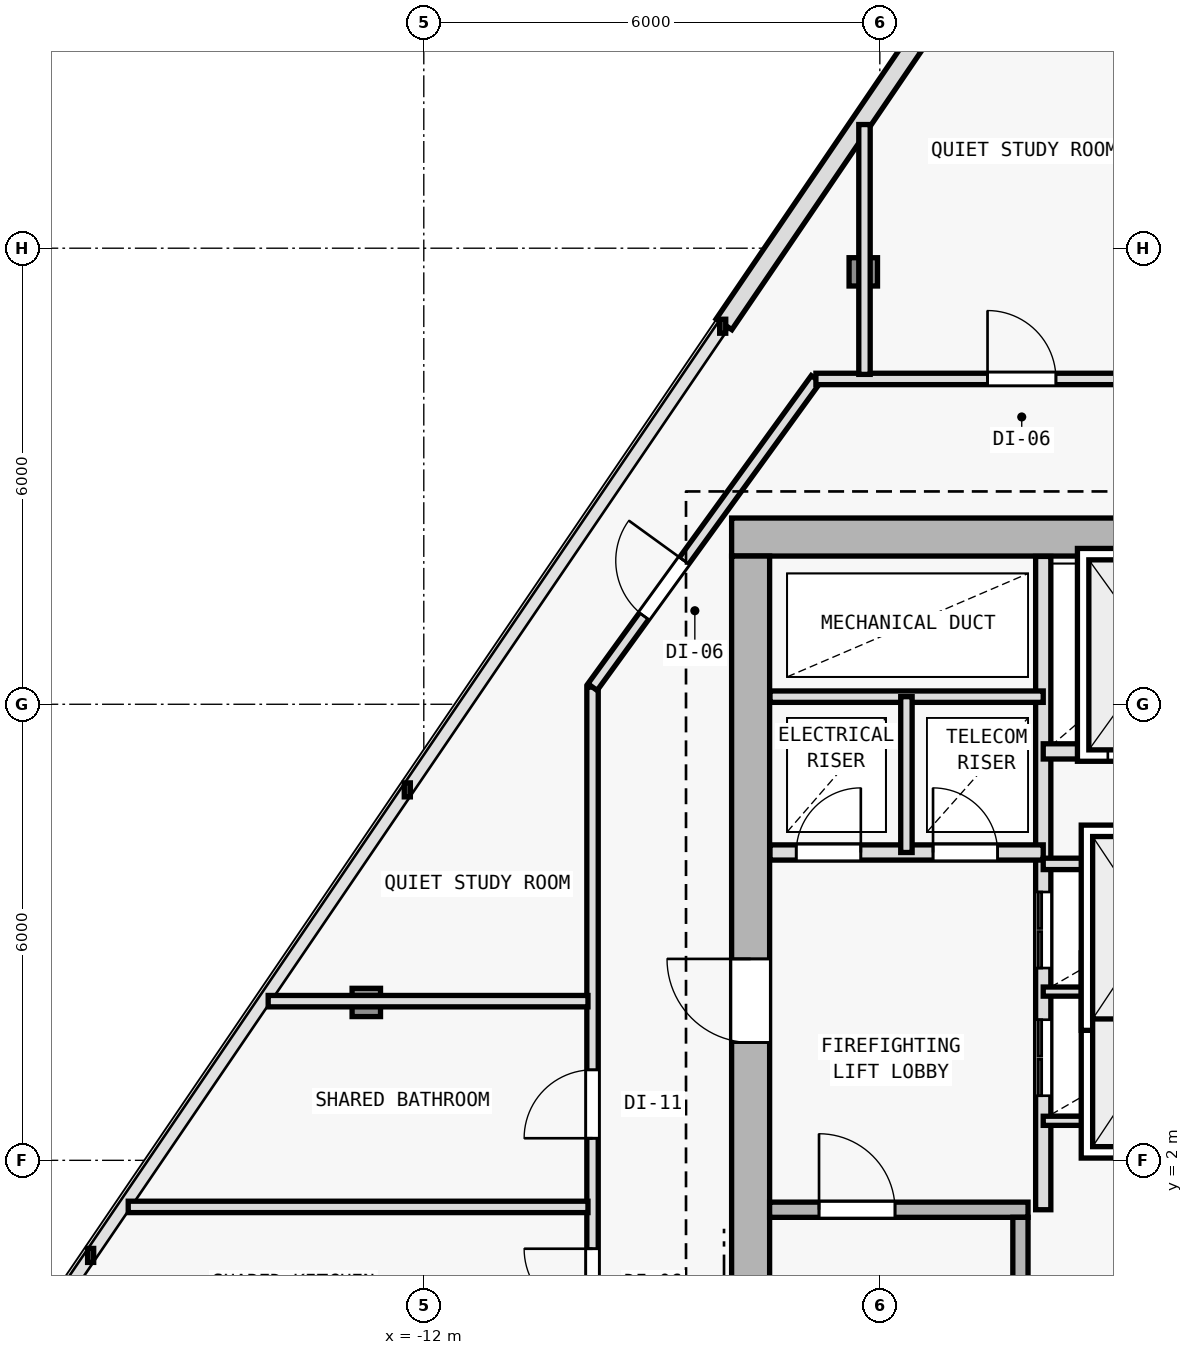
"""IFC4 building model, lengths in metres.
Left out: names, types, materials, properties, quantities, classifications, styles, units other than length and angle.
Written with IfcOpenShell. Run it as: python <this file> out.ifc"""

import sys

from ifc_helpers import new_model, si_unit, direction, frame, frame_2d, origin, origin_2d, place, context, subcontext, project, spatial, rectangle, i_section, extrude, element, fill, save


model = new_model("IFC4")
c1 = context("Model", 3, precision=1e-05, world=origin(), true_north=direction((0.0, 1.0)))
c2 = subcontext(c1, "Body", "Model", "MODEL_VIEW")
j1 = project(units=[si_unit("LENGTHUNIT", "METRE"), si_unit("PLANEANGLEUNIT", "RADIAN")], contexts=[c1])
p1 = place(None, origin())
s1 = spatial("IfcSite", under=j1, at=p1, CompositionType="ELEMENT")
p2 = place(p1, origin())
s2 = spatial("IfcBuilding", under=s1, at=p2, CompositionType="ELEMENT")
p3 = place(p2, frame((0.0, 0.0, 234.3)))
s3 = spatial("IfcBuildingStorey", under=s2, at=p3, CompositionType="ELEMENT", Elevation=234.3)
for number, where, z_axis, x_axis in (
    (1, (-7.7, 10.2, 0.0), (0.0, 0.0, 1.0), (1.0, 0.0, 0.0)),
    (2, (-7.7, 2.0, 0.0), (0.0, 0.0, 1.0), (1.0, 0.0, 0.0)),
):
    element("IfcColumn", number, at=place(p3, frame(where, z_axis=z_axis, x_axis=x_axis)), inside=s3, PredefinedType="COLUMN", context=c2, shape_type="SweptSolid", body=[
        extrude(i_section(OverallWidth=0.398, OverallDepth=0.387, WebThickness=0.013, FlangeThickness=0.022, FilletRadius=0.015, at=origin_2d()), origin(), (0.0, 0.0, 1.0), 3.6),
    ])
p4 = place(p3, frame((-6.218, 13.689, 0.005), z_axis=(0.008774546149, -0.002584750028, 0.999958162328), x_axis=(0.282568886397, 0.959247009086, 0.0)))
e3 = element("IfcColumn", 3, at=p4, inside=s3, PredefinedType="COLUMN", context=c2, shape_type="SweptSolid", body=[
    extrude(i_section(OverallWidth=0.374, OverallDepth=0.372, WebThickness=0.012, FlangeThickness=0.02, FilletRadius=0.015, at=origin_2d()), origin(), (0.0, 0.0, 1.0), 3.589),
])
p5 = place(p3, frame((-12.756, 4.077, 0.005), z_axis=(0.01700241672, 0.009521353363, 0.999810112799), x_axis=(-0.488603368932, 0.87250601595, 0.0)))
e4 = element("IfcColumn", 4, at=p5, inside=s3, PredefinedType="COLUMN", context=c2, shape_type="SweptSolid", body=[
    extrude(i_section(OverallWidth=0.374, OverallDepth=0.372, WebThickness=0.012, FlangeThickness=0.02, FilletRadius=0.015, at=origin_2d()), origin(), (0.0, 0.0, 1.0), 3.59),
])
p6 = place(p3, frame((-8.05, 12.998, 0.0), z_axis=(0.0, 0.0, 1.0), x_axis=(0.562447281182, 0.826833148762, 0.0)))
e5 = element("IfcWall", 5, at=p6, inside=s3, PredefinedType="SOLIDWALL", context=c2, shape_type="SweptSolid", body=[
    extrude(rectangle(XDim=10.411, YDim=0.25, at=frame_2d((5.205, 0.0))), origin(), (0.0, 0.0, 1.0), 3.35),
])
p7 = place(p6, frame((4.405, 0.0, 0.62)))
e6 = element("IfcOpeningElement", 6, at=p7, cuts=e5, PredefinedType="OPENING", context=c2, shape_type="SweptSolid", body=[
    extrude(rectangle(XDim=1.6, YDim=2.1, at=frame_2d((0.8, 1.05))), frame((0.0, 0.135, 0.0), z_axis=(0.0, -1.0, 0.0), x_axis=(1.0, 0.0, 0.0)), (0.0, 0.0, 1.0), 0.27),
])
p8 = place(p3, frame((7.95, 10.2, 0.0), z_axis=(0.0, 0.0, 1.0), x_axis=(-1.0, 0.0, 0.0)))
e7 = element("IfcWall", 7, at=p8, inside=s3, PredefinedType="SHEAR", context=c2, shape_type="SweptSolid", body=[
    extrude(rectangle(XDim=15.9, YDim=0.5, at=frame_2d((7.95, 0.0))), origin(), (0.0, 0.0, 1.0), 3.35),
])
p9 = place(p8, frame((4.4, 0.0, 0.0)))
e8 = element("IfcOpeningElement", 8, at=p9, cuts=e7, PredefinedType="OPENING", context=c2, shape_type="SweptSolid", body=[
    extrude(rectangle(XDim=1.1, YDim=2.15, at=frame_2d((0.55, 1.075))), frame((0.0, 0.26, 0.0), z_axis=(0.0, -1.0, 0.0), x_axis=(1.0, 0.0, 0.0)), (0.0, 0.0, 1.0), 0.52),
])
p10 = place(p3, frame((-7.7, -9.15, 0.0), z_axis=(0.0, 0.0, 1.0), x_axis=(0.0, 1.0, 0.0)))
e9 = element("IfcWall", 9, at=p10, inside=s3, PredefinedType="SHEAR", context=c2, shape_type="SweptSolid", body=[
    extrude(rectangle(XDim=19.1, YDim=0.5, at=frame_2d((9.55, 0.0))), origin(), (0.0, 0.0, 1.0), 3.35),
])
p11 = place(p10, frame((12.7, 0.0, 0.0)))
e10 = element("IfcOpeningElement", 10, at=p11, cuts=e9, PredefinedType="OPENING", context=c2, shape_type="SweptSolid", body=[
    extrude(rectangle(XDim=1.1, YDim=2.15, at=frame_2d((0.55, 1.075))), frame((0.0, 0.26, 0.0), z_axis=(0.0, -1.0, 0.0), x_axis=(1.0, 0.0, 0.0)), (0.0, 0.0, 1.0), 0.52),
])
p12 = place(p3, frame((-7.45, 1.35, 0.0), z_axis=(0.0, 0.0, 1.0), x_axis=(1.0, 0.0, 0.0)))
e11 = element("IfcWall", 11, at=p12, inside=s3, PredefinedType="SOLIDWALL", context=c2, shape_type="SweptSolid", body=[
    extrude(rectangle(XDim=3.4, YDim=0.2, at=frame_2d((1.7, 0.0))), origin(), (0.0, 0.0, 1.0), 3.35),
])
p13 = place(p12, frame((0.65, 0.0, 0.0)))
e12 = element("IfcOpeningElement", 12, at=p13, cuts=e11, PredefinedType="OPENING", context=c2, shape_type="SweptSolid", body=[
    extrude(rectangle(XDim=1.0, YDim=2.15, at=frame_2d((0.5, 1.075))), frame((0.0, 0.11, 0.0), z_axis=(0.0, -1.0, 0.0), x_axis=(1.0, 0.0, 0.0)), (0.0, 0.0, 1.0), 0.22),
])
p14 = place(p3, frame((-4.15, -5.95, 0.0), z_axis=(0.0, 0.0, 1.0), x_axis=(0.0, 1.0, 0.0)))
e13 = element("IfcWall", 13, at=p14, inside=s3, PredefinedType="SOLIDWALL", context=c2, shape_type="SweptSolid", body=[
    extrude(rectangle(XDim=7.2, YDim=0.2, at=frame_2d((3.6, 0.0))), origin(), (0.0, 0.0, 1.0), 3.35),
])
p15 = place(p3, frame((-3.85, 1.35, 0.0), z_axis=(0.0, 0.0, 1.0), x_axis=(0.0, 1.0, 0.0)))
e14 = element("IfcWall", 14, at=p15, inside=s3, PredefinedType="SOLIDWALL", context=c2, shape_type="SweptSolid", body=[
    extrude(rectangle(XDim=8.595, YDim=0.2, at=frame_2d((4.297, 0.0))), origin(), (0.0, 0.0, 1.0), 3.35),
])
p16 = place(p15, frame((1.5, 0.0, 0.0)))
e15 = element("IfcOpeningElement", 15, at=p16, cuts=e14, PredefinedType="OPENING", context=c2, shape_type="SweptSolid", body=[
    extrude(rectangle(XDim=1.0, YDim=2.15, at=frame_2d((0.5, 1.075))), frame((0.0, 0.11, 0.0), z_axis=(0.0, -1.0, 0.0), x_axis=(1.0, 0.0, 0.0)), (0.0, 0.0, 1.0), 0.22),
])
p17 = place(p15, frame((3.18, 0.0, 0.0)))
e16 = element("IfcOpeningElement", 16, at=p17, cuts=e14, PredefinedType="OPENING", context=c2, shape_type="SweptSolid", body=[
    extrude(rectangle(XDim=1.0, YDim=2.15, at=frame_2d((0.5, 1.075))), frame((0.0, 0.11, 0.0), z_axis=(0.0, -1.0, 0.0), x_axis=(1.0, 0.0, 0.0)), (0.0, 0.0, 1.0), 0.22),
])
p18 = place(p3, frame((-7.445, 6.05, 0.0), z_axis=(0.0, 0.0, 1.0), x_axis=(1.0, 0.0, 0.0)))
e17 = element("IfcWall", 17, at=p18, inside=s3, PredefinedType="SOLIDWALL", context=c2, shape_type="SweptSolid", body=[
    extrude(rectangle(XDim=3.595, YDim=0.2, at=frame_2d((1.797, 0.0))), origin(), (0.0, 0.0, 1.0), 3.35),
])
p19 = place(p18, frame((0.345, 0.0, 0.0)))
e18 = element("IfcOpeningElement", 18, at=p19, cuts=e17, PredefinedType="OPENING", context=c2, shape_type="SweptSolid", body=[
    extrude(rectangle(XDim=0.85, YDim=2.1, at=frame_2d((0.425, 1.05))), frame((0.0, 0.11, 0.0), z_axis=(0.0, -1.0, 0.0), x_axis=(1.0, 0.0, 0.0)), (0.0, 0.0, 1.0), 0.22),
])
p20 = place(p18, frame((2.145, 0.0, 0.0)))
e19 = element("IfcOpeningElement", 19, at=p20, cuts=e17, PredefinedType="OPENING", context=c2, shape_type="SweptSolid", body=[
    extrude(rectangle(XDim=0.85, YDim=2.1, at=frame_2d((0.425, 1.05))), frame((0.0, 0.11, 0.0), z_axis=(0.0, -1.0, 0.0), x_axis=(1.0, 0.0, 0.0)), (0.0, 0.0, 1.0), 0.22),
])
p21 = place(p3, frame((-7.445, 8.1, 0.0), z_axis=(0.0, 0.0, 1.0), x_axis=(1.0, 0.0, 0.0)))
e20 = element("IfcWall", 20, at=p21, inside=s3, PredefinedType="PARTITIONING", context=c2, shape_type="SweptSolid", body=[
    extrude(rectangle(XDim=3.595, YDim=0.15, at=frame_2d((1.797, 0.0))), origin(), (0.0, 0.0, 1.0), 3.35),
])
p22 = place(p3, frame((-5.65, 6.05, 0.0), z_axis=(0.0, 0.0, 1.0), x_axis=(0.0, 1.0, 0.0)))
e21 = element("IfcWall", 21, at=p22, inside=s3, PredefinedType="PARTITIONING", context=c2, shape_type="SweptSolid", body=[
    extrude(rectangle(XDim=2.05, YDim=0.15, at=frame_2d((1.025, 0.0))), origin(), (0.0, 0.0, 1.0), 3.35),
])
for number, where, z_axis, x_axis in (
    (22, (-3.85, 2.52, 0.0), (0.0, 0.0, 1.0), (1.0, 0.0, 0.0)),
    (23, (-3.85, 4.22, 0.0), (0.0, 0.0, 1.0), (1.0, 0.0, 0.0)),
):
    element("IfcWall", number, at=place(p3, frame(where, z_axis=z_axis, x_axis=x_axis)), inside=s3, PredefinedType="PARTITIONING", context=c2, shape_type="SweptSolid", body=[
        extrude(rectangle(XDim=2.9, YDim=0.12, at=frame_2d((1.45, 0.0))), origin(), (0.0, 0.0, 1.0), 3.35),
    ])
p23 = place(p3, frame((-3.85, 5.9, 0.0), z_axis=(0.0, 0.0, 1.0), x_axis=(1.0, 0.0, 0.0)))
e24 = element("IfcWall", 24, at=p23, inside=s3, PredefinedType="PARTITIONING", context=c2, shape_type="SweptSolid", body=[
    extrude(rectangle(XDim=2.9, YDim=0.15, at=frame_2d((1.45, 0.0))), origin(), (0.0, 0.0, 1.0), 3.35),
])
p24 = place(p3, frame((-3.85, 7.38, 0.0), z_axis=(0.0, 0.0, 1.0), x_axis=(1.0, 0.0, 0.0)))
e25 = element("IfcWall", 25, at=p24, inside=s3, PredefinedType="SOLIDWALL", context=c2, shape_type="SweptSolid", body=[
    extrude(rectangle(XDim=2.9, YDim=0.2, at=frame_2d((1.45, 0.0))), origin(), (0.0, 0.0, 1.0), 3.35),
])
p25 = place(p24, frame((0.85, 0.0, 0.0)))
e26 = element("IfcOpeningElement", 26, at=p25, cuts=e25, PredefinedType="OPENING", context=c2, shape_type="SweptSolid", body=[
    extrude(rectangle(XDim=1.2, YDim=2.2, at=frame_2d((0.6, 1.1))), frame((0.0, 0.11, 0.0), z_axis=(0.0, -1.0, 0.0), x_axis=(1.0, 0.0, 0.0)), (0.0, 0.0, 1.0), 0.22),
])
p26 = place(p3, frame((-9.78, -11.48, 0.0), z_axis=(0.0, 0.0, 1.0), x_axis=(0.0, 1.0, 0.0)))
e27 = element("IfcWall", 27, at=p26, inside=s3, PredefinedType="PARTITIONING", context=c2, shape_type="SweptSolid", body=[
    extrude(rectangle(XDim=19.706, YDim=0.15, at=frame_2d((9.853, 0.0))), origin(), (0.0, 0.0, 1.0), 2.775),
])
p27 = place(p26, frame((11.417, 0.0, 0.0)))
e28 = element("IfcOpeningElement", 28, at=p27, cuts=e27, PredefinedType="OPENING", context=c2, shape_type="SweptSolid", body=[
    extrude(rectangle(XDim=0.9, YDim=2.1, at=frame_2d((0.45, 1.05))), frame((0.0, 0.085, 0.0), z_axis=(0.0, -1.0, 0.0), x_axis=(1.0, 0.0, 0.0)), (0.0, 0.0, 1.0), 0.17),
])
p28 = place(p26, frame((9.24, 0.0, 0.0)))
e29 = element("IfcOpeningElement", 29, at=p28, cuts=e27, PredefinedType="OPENING", context=c2, shape_type="SweptSolid", body=[
    extrude(rectangle(XDim=0.9, YDim=2.1, at=frame_2d((0.45, 1.05))), frame((0.0, 0.085, 0.0), z_axis=(0.0, -1.0, 0.0), x_axis=(1.0, 0.0, 0.0)), (0.0, 0.0, 1.0), 0.17),
])
p29 = place(p26, frame((6.798, 0.0, 0.0)))
e30 = element("IfcOpeningElement", 30, at=p29, cuts=e27, PredefinedType="OPENING", context=c2, shape_type="SweptSolid", body=[
    extrude(rectangle(XDim=0.9, YDim=2.1, at=frame_2d((0.45, 1.05))), frame((0.0, 0.085, 0.0), z_axis=(0.0, -1.0, 0.0), x_axis=(1.0, 0.0, 0.0)), (0.0, 0.0, 1.0), 0.17),
])
p30 = place(p26, frame((4.526, 0.0, 0.0)))
e31 = element("IfcOpeningElement", 31, at=p30, cuts=e27, PredefinedType="OPENING", context=c2, shape_type="SweptSolid", body=[
    extrude(rectangle(XDim=0.9, YDim=2.1, at=frame_2d((0.45, 1.05))), frame((0.0, 0.085, 0.0), z_axis=(0.0, -1.0, 0.0), x_axis=(1.0, 0.0, 0.0)), (0.0, 0.0, 1.0), 0.17),
])
p31 = place(p26, frame((2.864, 0.0, 0.0)))
e32 = element("IfcOpeningElement", 32, at=p31, cuts=e27, PredefinedType="OPENING", context=c2, shape_type="SweptSolid", body=[
    extrude(rectangle(XDim=0.85, YDim=2.1, at=frame_2d((0.425, 1.05))), frame((0.0, 0.085, 0.0), z_axis=(0.0, -1.0, 0.0), x_axis=(1.0, 0.0, 0.0)), (0.0, 0.0, 1.0), 0.17),
])
p32 = place(p26, frame((0.969, 0.0, 0.0)))
e33 = element("IfcOpeningElement", 33, at=p32, cuts=e27, PredefinedType="OPENING", context=c2, shape_type="SweptSolid", body=[
    extrude(rectangle(XDim=0.9, YDim=2.1, at=frame_2d((0.45, 1.05))), frame((0.0, 0.085, 0.0), z_axis=(0.0, -1.0, 0.0), x_axis=(1.0, 0.0, 0.0)), (0.0, 0.0, 1.0), 0.17),
])
p33 = place(p26, frame((13.771, 0.0, 0.0)))
e34 = element("IfcOpeningElement", 34, at=p33, cuts=e27, PredefinedType="OPENING", context=c2, shape_type="SweptSolid", body=[
    extrude(rectangle(XDim=0.9, YDim=2.1, at=frame_2d((0.45, 1.05))), frame((0.0, 0.085, 0.0), z_axis=(0.0, -1.0, 0.0), x_axis=(1.0, 0.0, 0.0)), (0.0, 0.0, 1.0), 0.17),
])
p34 = place(p3, frame((-9.78, 8.226, 0.0), z_axis=(0.0, 0.0, 1.0), x_axis=(0.586956386413, 0.809618552436, 0.0)))
e35 = element("IfcWall", 35, at=p34, inside=s3, PredefinedType="PARTITIONING", context=c2, shape_type="SweptSolid", body=[
    extrude(rectangle(XDim=5.008, YDim=0.15, at=frame_2d((2.504, 0.0))), origin(), (0.0, 0.0, 1.0), 2.975),
])
p35 = place(p34, frame((1.154, 0.0, 0.0)))
e36 = element("IfcOpeningElement", 36, at=p35, cuts=e35, PredefinedType="OPENING", context=c2, shape_type="SweptSolid", body=[
    extrude(rectangle(XDim=0.9, YDim=2.1, at=frame_2d((0.45, 1.05))), frame((0.0, 0.085, 0.0), z_axis=(0.0, -1.0, 0.0), x_axis=(1.0, 0.0, 0.0)), (0.0, 0.0, 1.0), 0.17),
])
p36 = place(p3, frame((-6.841, 12.28, 0.0), z_axis=(0.0, 0.0, 1.0), x_axis=(1.0, 0.0, 0.0)))
e37 = element("IfcWall", 37, at=p36, inside=s3, PredefinedType="PARTITIONING", context=c2, shape_type="SweptSolid", body=[
    extrude(rectangle(XDim=13.682, YDim=0.15, at=frame_2d((6.841, 0.0))), origin(), (0.0, 0.0, 1.0), 2.975),
])
p37 = place(p36, frame((12.423, 0.0, 0.0)))
e38 = element("IfcOpeningElement", 38, at=p37, cuts=e37, PredefinedType="OPENING", context=c2, shape_type="SweptSolid", body=[
    extrude(rectangle(XDim=0.85, YDim=2.1, at=frame_2d((0.425, 1.05))), frame((0.0, 0.085, 0.0), z_axis=(0.0, -1.0, 0.0), x_axis=(1.0, 0.0, 0.0)), (0.0, 0.0, 1.0), 0.17),
])
p38 = place(p36, frame((9.674, 0.0, 0.0)))
e39 = element("IfcOpeningElement", 39, at=p38, cuts=e37, PredefinedType="OPENING", context=c2, shape_type="SweptSolid", body=[
    extrude(rectangle(XDim=0.9, YDim=2.1, at=frame_2d((0.45, 1.05))), frame((0.0, 0.085, 0.0), z_axis=(0.0, -1.0, 0.0), x_axis=(1.0, 0.0, 0.0)), (0.0, 0.0, 1.0), 0.17),
])
p39 = place(p36, frame((5.941, 0.0, 0.0)))
e40 = element("IfcOpeningElement", 40, at=p39, cuts=e37, PredefinedType="OPENING", context=c2, shape_type="SweptSolid", body=[
    extrude(rectangle(XDim=0.9, YDim=2.1, at=frame_2d((0.45, 1.05))), frame((0.0, 0.085, 0.0), z_axis=(0.0, -1.0, 0.0), x_axis=(1.0, 0.0, 0.0)), (0.0, 0.0, 1.0), 0.17),
])
p40 = place(p36, frame((2.258, 0.0, 0.0)))
e41 = element("IfcOpeningElement", 41, at=p40, cuts=e37, PredefinedType="OPENING", context=c2, shape_type="SweptSolid", body=[
    extrude(rectangle(XDim=0.9, YDim=2.1, at=frame_2d((0.45, 1.05))), frame((0.0, 0.085, 0.0), z_axis=(0.0, -1.0, 0.0), x_axis=(1.0, 0.0, 0.0)), (0.0, 0.0, 1.0), 0.17),
])
p41 = place(p3, frame((-6.202, 12.34, 0.0), z_axis=(0.0, 0.0, 1.0), x_axis=(0.0, 1.0, 0.0)))
e42 = element("IfcWall", 42, at=p41, inside=s3, PredefinedType="PARTITIONING", context=c2, shape_type="SweptSolid", body=[
    extrude(rectangle(XDim=3.287, YDim=0.15, at=frame_2d((1.644, 0.0))), origin(), (0.0, 0.0, 1.0), 2.975),
])
p42 = place(p3, frame((-9.84, 4.094, 0.0), z_axis=(0.0, 0.0, 1.0), x_axis=(-1.0, 0.0, 0.0)))
e43 = element("IfcWall", 43, at=p42, inside=s3, PredefinedType="PARTITIONING", context=c2, shape_type="SweptSolid", body=[
    extrude(rectangle(XDim=4.207, YDim=0.15, at=frame_2d((2.104, 0.0))), origin(), (0.0, 0.0, 1.0), 2.975),
])
p43 = place(p3, frame((-9.84, 1.387, 0.0), z_axis=(0.0, 0.0, 1.0), x_axis=(-1.0, 0.0, 0.0)))
e44 = element("IfcWall", 44, at=p43, inside=s3, PredefinedType="PARTITIONING", context=c2, shape_type="SweptSolid", body=[
    extrude(rectangle(XDim=6.049, YDim=0.15, at=frame_2d((3.024, 0.0))), origin(), (0.0, 0.0, 1.0), 2.725),
])
p44 = place(p11, origin())
e45 = element("IfcDoor", 45, at=p44, inside=s3, OperationType="SINGLE_SWING_RIGHT", PredefinedType="DOOR", context=c2, shape_type="SweptSolid", body=[
    extrude(rectangle(XDim=1.1, YDim=2.15, at=frame_2d((0.55, 1.075))), frame((0.0, 0.025, 0.0), z_axis=(0.0, -1.0, 0.0), x_axis=(1.0, 0.0, 0.0)), (0.0, 0.0, 1.0), 0.05),
])
fill(e10, e45)
p45 = place(p13, origin())
e46 = element("IfcDoor", 46, at=p45, inside=s3, OperationType="SINGLE_SWING_LEFT", PredefinedType="DOOR", context=c2, shape_type="SweptSolid", body=[
    extrude(rectangle(XDim=1.0, YDim=2.15, at=frame_2d((0.5, 1.075))), frame((0.0, 0.025, 0.0), z_axis=(0.0, -1.0, 0.0), x_axis=(1.0, 0.0, 0.0)), (0.0, 0.0, 1.0), 0.05),
])
fill(e12, e46)
p46 = place(p19, origin())
e47 = element("IfcDoor", 47, at=p46, inside=s3, OperationType="SINGLE_SWING_RIGHT", PredefinedType="DOOR", context=c2, shape_type="SweptSolid", body=[
    extrude(rectangle(XDim=0.85, YDim=2.1, at=frame_2d((0.425, 1.05))), frame((0.0, 0.025, 0.0), z_axis=(0.0, -1.0, 0.0), x_axis=(1.0, 0.0, 0.0)), (0.0, 0.0, 1.0), 0.05),
])
fill(e18, e47)
p47 = place(p20, origin())
e48 = element("IfcDoor", 48, at=p47, inside=s3, OperationType="SINGLE_SWING_LEFT", PredefinedType="DOOR", context=c2, shape_type="SweptSolid", body=[
    extrude(rectangle(XDim=0.85, YDim=2.1, at=frame_2d((0.425, 1.05))), frame((0.0, 0.025, 0.0), z_axis=(0.0, -1.0, 0.0), x_axis=(1.0, 0.0, 0.0)), (0.0, 0.0, 1.0), 0.05),
])
fill(e19, e48)
p48 = place(p25, origin())
e49 = element("IfcDoor", 49, at=p48, inside=s3, OperationType="DOUBLE_DOOR_SLIDING", PredefinedType="DOOR", context=c2, shape_type="SweptSolid", body=[
    extrude(rectangle(XDim=1.2, YDim=2.2, at=frame_2d((0.6, 1.1))), frame((0.0, 0.025, 0.0), z_axis=(0.0, -1.0, 0.0), x_axis=(1.0, 0.0, 0.0)), (0.0, 0.0, 1.0), 0.05),
])
fill(e26, e49)
p49 = place(p16, origin())
e50 = element("IfcDoor", 50, at=p49, inside=s3, OperationType="DOUBLE_DOOR_SLIDING", PredefinedType="DOOR", context=c2, shape_type="SweptSolid", body=[
    extrude(rectangle(XDim=1.0, YDim=2.15, at=frame_2d((0.5, 1.075))), frame((0.0, 0.025, 0.0), z_axis=(0.0, -1.0, 0.0), x_axis=(1.0, 0.0, 0.0)), (0.0, 0.0, 1.0), 0.05),
])
fill(e15, e50)
p50 = place(p17, origin())
e51 = element("IfcDoor", 51, at=p50, inside=s3, OperationType="DOUBLE_DOOR_SLIDING", PredefinedType="DOOR", context=c2, shape_type="SweptSolid", body=[
    extrude(rectangle(XDim=1.0, YDim=2.15, at=frame_2d((0.5, 1.075))), frame((0.0, 0.025, 0.0), z_axis=(0.0, -1.0, 0.0), x_axis=(1.0, 0.0, 0.0)), (0.0, 0.0, 1.0), 0.05),
])
fill(e16, e51)
p51 = place(p27, origin())
e52 = element("IfcDoor", 52, at=p51, inside=s3, OperationType="SINGLE_SWING_RIGHT", PredefinedType="DOOR", context=c2, shape_type="SweptSolid", body=[
    extrude(rectangle(XDim=0.9, YDim=2.1, at=frame_2d((0.45, 1.05))), frame((0.0, 0.025, 0.0), z_axis=(0.0, -1.0, 0.0), x_axis=(1.0, 0.0, 0.0)), (0.0, 0.0, 1.0), 0.05),
])
fill(e28, e52)
p52 = place(p40, origin())
e53 = element("IfcDoor", 53, at=p52, inside=s3, OperationType="SINGLE_SWING_LEFT", PredefinedType="DOOR", context=c2, shape_type="SweptSolid", body=[
    extrude(rectangle(XDim=0.9, YDim=2.1, at=frame_2d((0.45, 1.05))), frame((0.0, 0.025, 0.0), z_axis=(0.0, -1.0, 0.0), x_axis=(1.0, 0.0, 0.0)), (0.0, 0.0, 1.0), 0.05),
])
fill(e41, e53)
p53 = place(p35, origin())
e54 = element("IfcDoor", 54, at=p53, inside=s3, OperationType="SINGLE_SWING_RIGHT", PredefinedType="DOOR", context=c2, shape_type="SweptSolid", body=[
    extrude(rectangle(XDim=0.9, YDim=2.1, at=frame_2d((0.45, 1.05))), frame((0.0, 0.025, 0.0), z_axis=(0.0, -1.0, 0.0), x_axis=(1.0, 0.0, 0.0)), (0.0, 0.0, 1.0), 0.05),
])
fill(e36, e54)
p54 = place(p33, origin())
e55 = element("IfcDoor", 55, at=p54, inside=s3, OperationType="SINGLE_SWING_LEFT", PredefinedType="DOOR", context=c2, shape_type="SweptSolid", body=[
    extrude(rectangle(XDim=0.9, YDim=2.1, at=frame_2d((0.45, 1.05))), frame((0.0, 0.025, 0.0), z_axis=(0.0, -1.0, 0.0), x_axis=(1.0, 0.0, 0.0)), (0.0, 0.0, 1.0), 0.05),
])
fill(e34, e55)
save(model, sys.argv[1])
